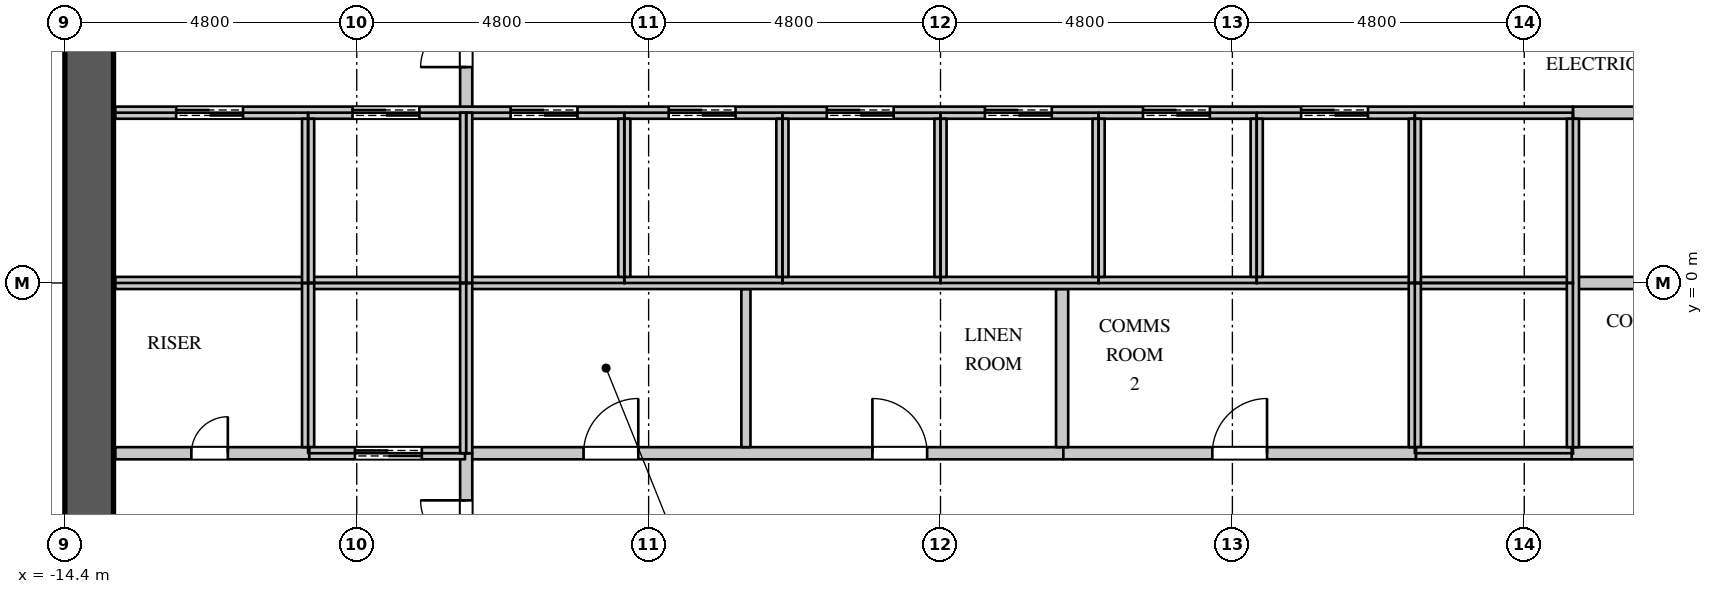
"""IFC4 building model, lengths in metres.
Left out: names, types, materials, properties, quantities, classifications, styles, units other than length and angle.
Written with IfcOpenShell. Run it as: python <this file> out.ifc"""

import sys

from ifc_helpers import new_model, si_unit, direction, frame, frame_2d, origin, place, context, subcontext, project, spatial, rectangle, extrude, element, fill, save


model = new_model("IFC4")
c1 = context("Model", 3, precision=1e-05, world=origin(), true_north=direction((0.0, 1.0)))
c2 = subcontext(c1, "Body", "Model", "MODEL_VIEW")
j1 = project(units=[si_unit("LENGTHUNIT", "METRE"), si_unit("PLANEANGLEUNIT", "RADIAN")], contexts=[c1])
p1 = place(None, origin())
s1 = spatial("IfcSite", under=j1, at=p1, CompositionType="ELEMENT")
p2 = place(p1, origin())
s2 = spatial("IfcBuilding", under=s1, at=p2, CompositionType="ELEMENT")
p3 = place(p2, frame((0.0, 0.0, 131.7)))
s3 = spatial("IfcBuildingStorey", under=s2, at=p3, CompositionType="ELEMENT", Elevation=131.7)
p4 = place(p3, frame((-14.0, -11.2, 0.0), z_axis=(0.0, 0.0, 1.0), x_axis=(0.0, 1.0, 0.0)))
e1 = element("IfcWall", 1, at=p4, inside=s3, PredefinedType="SHEAR", context=c2, shape_type="SweptSolid", body=[
    extrude(rectangle(XDim=22.4, YDim=0.8, at=frame_2d((11.2, 0.0))), origin(), (0.0, 0.0, 1.0), 4.2),
])
p5 = place(p4, frame((20.25, 0.0, 0.0)))
e2 = element("IfcOpeningElement", 2, at=p5, cuts=e1, PredefinedType="OPENING", context=c2, shape_type="SweptSolid", body=[
    extrude(rectangle(XDim=1.1, YDim=2.2, at=frame_2d((0.55, 1.1))), frame((0.0, 0.41, 0.0), z_axis=(0.0, -1.0, 0.0), x_axis=(1.0, 0.0, 0.0)), (0.0, 0.0, 1.0), 0.82),
])
p6 = place(p4, frame((1.05, 0.0, 0.0)))
e3 = element("IfcOpeningElement", 3, at=p6, cuts=e1, PredefinedType="OPENING", context=c2, shape_type="SweptSolid", body=[
    extrude(rectangle(XDim=1.1, YDim=2.2, at=frame_2d((0.55, 1.1))), frame((0.0, 0.41, 0.0), z_axis=(0.0, -1.0, 0.0), x_axis=(1.0, 0.0, 0.0)), (0.0, 0.0, 1.0), 0.82),
])
p7 = place(p4, frame((15.95, 0.0, 0.0)))
e4 = element("IfcOpeningElement", 4, at=p7, cuts=e1, PredefinedType="OPENING", context=c2, shape_type="SweptSolid", body=[
    extrude(rectangle(XDim=1.5, YDim=2.4, at=frame_2d((0.75, 1.2))), frame((0.0, 0.41, 0.0), z_axis=(0.0, -1.0, 0.0), x_axis=(1.0, 0.0, 0.0)), (0.0, 0.0, 1.0), 0.82),
])
p8 = place(p4, frame((4.95, 0.0, 0.0)))
e5 = element("IfcOpeningElement", 5, at=p8, cuts=e1, PredefinedType="OPENING", context=c2, shape_type="SweptSolid", body=[
    extrude(rectangle(XDim=1.5, YDim=2.4, at=frame_2d((0.75, 1.2))), frame((0.0, 0.41, 0.0), z_axis=(0.0, -1.0, 0.0), x_axis=(1.0, 0.0, 0.0)), (0.0, 0.0, 1.0), 0.82),
])
p9 = place(p3, frame((-7.82, -2.8, 0.0), z_axis=(0.0, 0.0, 1.0), x_axis=(1.0, 0.0, 0.0)))
e6 = element("IfcWall", 6, at=p9, inside=s3, PredefinedType="PARTITIONING", context=c2, shape_type="SweptSolid", body=[
    extrude(rectangle(XDim=9.84, YDim=0.2, at=frame_2d((4.92, 0.0))), origin(), (0.0, 0.0, 1.0), 3.95),
])
p10 = place(p9, frame((1.95, 0.0, 0.0)))
e7 = element("IfcOpeningElement", 7, at=p10, cuts=e6, PredefinedType="OPENING", context=c2, shape_type="SweptSolid", body=[
    extrude(rectangle(XDim=0.9, YDim=2.2, at=frame_2d((0.45, 1.1))), frame((0.0, 0.11, 0.0), z_axis=(0.0, -1.0, 0.0), x_axis=(1.0, 0.0, 0.0)), (0.0, 0.0, 1.0), 0.22),
])
p11 = place(p9, frame((6.7, 0.0, 0.0)))
e8 = element("IfcOpeningElement", 8, at=p11, cuts=e6, PredefinedType="OPENING", context=c2, shape_type="SweptSolid", body=[
    extrude(rectangle(XDim=0.9, YDim=2.2, at=frame_2d((0.45, 1.1))), frame((0.0, 0.11, 0.0), z_axis=(0.0, -1.0, 0.0), x_axis=(1.0, 0.0, 0.0)), (0.0, 0.0, 1.0), 0.22),
])
p12 = place(p3, frame((-7.8, -8.075, 0.0), z_axis=(0.0, 0.0, 1.0), x_axis=(0.0, 1.0, 0.0)))
e9 = element("IfcWall", 9, at=p12, inside=s3, PredefinedType="PARTITIONING", context=c2, shape_type="SweptSolid", body=[
    extrude(rectangle(XDim=5.275, YDim=0.2, at=frame_2d((2.637, 0.0))), origin(), (0.0, 0.0, 1.0), 3.95),
])
p13 = place(p12, frame((3.0, 0.0, 0.0)))
e10 = element("IfcOpeningElement", 10, at=p13, cuts=e9, PredefinedType="OPENING", context=c2, shape_type="SweptSolid", body=[
    extrude(rectangle(XDim=1.5, YDim=2.4, at=frame_2d((0.75, 1.2))), frame((0.0, 0.11, 0.0), z_axis=(0.0, -1.0, 0.0), x_axis=(1.0, 0.0, 0.0)), (0.0, 0.0, 1.0), 0.22),
])
p14 = place(p3, frame((-7.8, 2.8, 0.0), z_axis=(0.0, 0.0, 1.0), x_axis=(0.0, 1.0, 0.0)))
e11 = element("IfcWall", 11, at=p14, inside=s3, PredefinedType="PARTITIONING", context=c2, shape_type="SweptSolid", body=[
    extrude(rectangle(XDim=5.275, YDim=0.2, at=frame_2d((2.637, 0.0))), origin(), (0.0, 0.0, 1.0), 3.95),
])
p15 = place(p14, frame((0.75, 0.0, 0.0)))
e12 = element("IfcOpeningElement", 12, at=p15, cuts=e11, PredefinedType="OPENING", context=c2, shape_type="SweptSolid", body=[
    extrude(rectangle(XDim=1.5, YDim=2.4, at=frame_2d((0.75, 1.2))), frame((0.0, 0.11, 0.0), z_axis=(0.0, -1.0, 0.0), x_axis=(1.0, 0.0, 0.0)), (0.0, 0.0, 1.0), 0.22),
])
p16 = place(p3, frame((-3.2, -2.7, 0.0), z_axis=(0.0, 0.0, 1.0), x_axis=(0.0, 1.0, 0.0)))
e13 = element("IfcWall", 13, at=p16, inside=s3, PredefinedType="PARTITIONING", context=c2, shape_type="SweptSolid", body=[
    extrude(rectangle(XDim=2.6, YDim=0.15, at=frame_2d((1.3, 0.0))), origin(), (0.0, 0.0, 1.0), 3.95),
])
p17 = place(p3, frame((-13.57, -2.8, 0.0), z_axis=(0.0, 0.0, 1.0), x_axis=(1.0, 0.0, 0.0)))
e14 = element("IfcWall", 14, at=p17, inside=s3, PredefinedType="PARTITIONING", context=c2, shape_type="SweptSolid", body=[
    extrude(rectangle(XDim=3.19, YDim=0.2, at=frame_2d((1.595, 0.0))), origin(), (0.0, 0.0, 1.0), 3.95),
])
p18 = place(p17, frame((1.25, 0.0, 0.0)))
e15 = element("IfcOpeningElement", 15, at=p18, cuts=e14, PredefinedType="OPENING", context=c2, shape_type="SweptSolid", body=[
    extrude(rectangle(XDim=0.6, YDim=2.0, at=frame_2d((0.3, 1.0))), frame((0.0, 0.11, 0.0), z_axis=(0.0, -1.0, 0.0), x_axis=(1.0, 0.0, 0.0)), (0.0, 0.0, 1.0), 0.22),
])
p19 = place(p3, frame((2.02, -2.8, 0.0), z_axis=(0.0, 0.0, 1.0), x_axis=(1.0, 0.0, 0.0)))
e16 = element("IfcWall", 16, at=p19, inside=s3, PredefinedType="PARTITIONING", context=c2, shape_type="SweptSolid", body=[
    extrude(rectangle(XDim=5.8, YDim=0.2, at=frame_2d((2.9, 0.0))), origin(), (0.0, 0.0, 1.0), 3.95),
])
p20 = place(p19, frame((2.45, 0.0, 0.0)))
e17 = element("IfcOpeningElement", 17, at=p20, cuts=e16, PredefinedType="OPENING", context=c2, shape_type="SweptSolid", body=[
    extrude(rectangle(XDim=0.9, YDim=2.2, at=frame_2d((0.45, 1.1))), frame((0.0, 0.11, 0.0), z_axis=(0.0, -1.0, 0.0), x_axis=(1.0, 0.0, 0.0)), (0.0, 0.0, 1.0), 0.22),
])
p21 = place(p3, frame((2.0, -2.7, 0.0), z_axis=(0.0, 0.0, 1.0), x_axis=(0.0, 1.0, 0.0)))
e18 = element("IfcWall", 18, at=p21, inside=s3, PredefinedType="PARTITIONING", context=c2, shape_type="SweptSolid", body=[
    extrude(rectangle(XDim=2.6, YDim=0.2, at=frame_2d((1.3, 0.0))), origin(), (0.0, 0.0, 1.0), 3.95),
])
p22 = place(p3, frame((10.38, -2.8, 0.0), z_axis=(0.0, 0.0, 1.0), x_axis=(1.0, 0.0, 0.0)))
e19 = element("IfcWall", 19, at=p22, inside=s3, PredefinedType="PARTITIONING", context=c2, shape_type="SweptSolid", body=[
    extrude(rectangle(XDim=3.19, YDim=0.2, at=frame_2d((1.595, 0.0))), origin(), (0.0, 0.0, 1.0), 3.95),
])
p23 = place(p22, frame((1.1, 0.0, 0.0)))
e20 = element("IfcOpeningElement", 20, at=p23, cuts=e19, PredefinedType="OPENING", context=c2, shape_type="SweptSolid", body=[
    extrude(rectangle(XDim=0.9, YDim=2.2, at=frame_2d((0.45, 1.1))), frame((0.0, 0.11, 0.0), z_axis=(0.0, -1.0, 0.0), x_axis=(1.0, 0.0, 0.0)), (0.0, 0.0, 1.0), 0.22),
])
p24 = place(p3, frame((10.4, 2.8, 0.0), z_axis=(0.0, 0.0, 1.0), x_axis=(1.0, 0.0, 0.0)))
e21 = element("IfcWall", 21, at=p24, inside=s3, PredefinedType="PARTITIONING", context=c2, shape_type="SweptSolid", body=[
    extrude(rectangle(XDim=3.17, YDim=0.2, at=frame_2d((1.585, 0.0))), origin(), (0.0, 0.0, 1.0), 3.95),
])
p25 = place(p24, frame((1.25, 0.0, 0.0)))
e22 = element("IfcOpeningElement", 22, at=p25, cuts=e21, PredefinedType="OPENING", context=c2, shape_type="SweptSolid", body=[
    extrude(rectangle(XDim=0.6, YDim=2.0, at=frame_2d((0.3, 1.0))), frame((0.0, 0.11, 0.0), z_axis=(0.0, -1.0, 0.0), x_axis=(1.0, 0.0, 0.0)), (0.0, 0.0, 1.0), 0.22),
])
p26 = place(p3, frame((10.4, 0.0, 0.0), z_axis=(0.0, 0.0, 1.0), x_axis=(1.0, 0.0, 0.0)))
e23 = element("IfcWall", 23, at=p26, inside=s3, PredefinedType="PARTITIONING", context=c2, shape_type="SweptSolid", body=[
    extrude(rectangle(XDim=3.17, YDim=0.2, at=frame_2d((1.585, 0.0))), origin(), (0.0, 0.0, 1.0), 3.95),
])
p27 = place(p3, frame((-13.57, 0.0, 0.0), z_axis=(0.0, 0.0, 1.0), x_axis=(1.0, 0.0, 0.0)))
e24 = element("IfcWall", 24, at=p27, inside=s3, PredefinedType="PARTITIONING", context=c2, shape_type="SweptSolid", body=[
    extrude(rectangle(XDim=23.97, YDim=0.2, at=frame_2d((11.985, 0.0))), origin(), (0.0, 0.0, 1.0), 3.95),
])
p28 = place(p3, frame((-13.57, 2.8, 0.0), z_axis=(0.0, 0.0, 1.0), x_axis=(1.0, 0.0, 0.0)))
e25 = element("IfcWall", 25, at=p28, inside=s3, PredefinedType="PARTITIONING", context=c2, shape_type="SweptSolid", body=[
    extrude(rectangle(XDim=23.97, YDim=0.2, at=frame_2d((11.985, 0.0))), origin(), (0.0, 0.0, 1.0), 3.95),
])
p29 = place(p28, frame((1.0, 0.0, 0.0)))
e26 = element("IfcOpeningElement", 26, at=p29, cuts=e25, PredefinedType="OPENING", context=c2, shape_type="SweptSolid", body=[
    extrude(rectangle(XDim=1.1, YDim=2.2, at=frame_2d((0.55, 1.1))), frame((0.0, 0.11, 0.0), z_axis=(0.0, -1.0, 0.0), x_axis=(1.0, 0.0, 0.0)), (0.0, 0.0, 1.0), 0.22),
])
p30 = place(p28, frame((3.9, 0.0, 0.0)))
e27 = element("IfcOpeningElement", 27, at=p30, cuts=e25, PredefinedType="OPENING", context=c2, shape_type="SweptSolid", body=[
    extrude(rectangle(XDim=1.1, YDim=2.2, at=frame_2d((0.55, 1.1))), frame((0.0, 0.11, 0.0), z_axis=(0.0, -1.0, 0.0), x_axis=(1.0, 0.0, 0.0)), (0.0, 0.0, 1.0), 0.22),
])
p31 = place(p28, frame((6.5, 0.0, 0.0)))
e28 = element("IfcOpeningElement", 28, at=p31, cuts=e25, PredefinedType="OPENING", context=c2, shape_type="SweptSolid", body=[
    extrude(rectangle(XDim=1.1, YDim=2.2, at=frame_2d((0.55, 1.1))), frame((0.0, 0.11, 0.0), z_axis=(0.0, -1.0, 0.0), x_axis=(1.0, 0.0, 0.0)), (0.0, 0.0, 1.0), 0.22),
])
p32 = place(p28, frame((9.1, 0.0, 0.0)))
e29 = element("IfcOpeningElement", 29, at=p32, cuts=e25, PredefinedType="OPENING", context=c2, shape_type="SweptSolid", body=[
    extrude(rectangle(XDim=1.1, YDim=2.2, at=frame_2d((0.55, 1.1))), frame((0.0, 0.11, 0.0), z_axis=(0.0, -1.0, 0.0), x_axis=(1.0, 0.0, 0.0)), (0.0, 0.0, 1.0), 0.22),
])
p33 = place(p28, frame((11.7, 0.0, 0.0)))
e30 = element("IfcOpeningElement", 30, at=p33, cuts=e25, PredefinedType="OPENING", context=c2, shape_type="SweptSolid", body=[
    extrude(rectangle(XDim=1.1, YDim=2.2, at=frame_2d((0.55, 1.1))), frame((0.0, 0.11, 0.0), z_axis=(0.0, -1.0, 0.0), x_axis=(1.0, 0.0, 0.0)), (0.0, 0.0, 1.0), 0.22),
])
p34 = place(p28, frame((14.3, 0.0, 0.0)))
e31 = element("IfcOpeningElement", 31, at=p34, cuts=e25, PredefinedType="OPENING", context=c2, shape_type="SweptSolid", body=[
    extrude(rectangle(XDim=1.1, YDim=2.2, at=frame_2d((0.55, 1.1))), frame((0.0, 0.11, 0.0), z_axis=(0.0, -1.0, 0.0), x_axis=(1.0, 0.0, 0.0)), (0.0, 0.0, 1.0), 0.22),
])
p35 = place(p28, frame((16.9, 0.0, 0.0)))
e32 = element("IfcOpeningElement", 32, at=p35, cuts=e25, PredefinedType="OPENING", context=c2, shape_type="SweptSolid", body=[
    extrude(rectangle(XDim=1.1, YDim=2.2, at=frame_2d((0.55, 1.1))), frame((0.0, 0.11, 0.0), z_axis=(0.0, -1.0, 0.0), x_axis=(1.0, 0.0, 0.0)), (0.0, 0.0, 1.0), 0.22),
])
p36 = place(p28, frame((19.5, 0.0, 0.0)))
e33 = element("IfcOpeningElement", 33, at=p36, cuts=e25, PredefinedType="OPENING", context=c2, shape_type="SweptSolid", body=[
    extrude(rectangle(XDim=1.1, YDim=2.2, at=frame_2d((0.55, 1.1))), frame((0.0, 0.11, 0.0), z_axis=(0.0, -1.0, 0.0), x_axis=(1.0, 0.0, 0.0)), (0.0, 0.0, 1.0), 0.22),
])
p37 = place(p3, frame((-10.4, -2.7, 0.0), z_axis=(0.0, 0.0, 1.0), x_axis=(0.0, 1.0, 0.0)))
e34 = element("IfcWall", 34, at=p37, inside=s3, PredefinedType="PARTITIONING", context=c2, shape_type="SweptSolid", body=[
    extrude(rectangle(XDim=2.7, YDim=0.2, at=frame_2d((1.35, 0.0))), origin(), (0.0, 0.0, 1.0), 3.95),
])
p38 = place(p3, frame((-10.38, -2.8, 0.0), z_axis=(0.0, 0.0, 1.0), x_axis=(1.0, 0.0, 0.0)))
e35 = element("IfcWall", 35, at=p38, inside=s3, PredefinedType="PARTITIONING", context=c2, shape_type="SweptSolid", body=[
    extrude(rectangle(XDim=2.56, YDim=0.2, at=frame_2d((1.28, 0.0))), origin(), (0.0, 0.0, 1.0), 3.95),
])
p39 = place(p38, frame((0.75, 0.0, 0.0)))
e36 = element("IfcOpeningElement", 36, at=p39, cuts=e35, PredefinedType="OPENING", context=c2, shape_type="SweptSolid", body=[
    extrude(rectangle(XDim=1.1, YDim=2.2, at=frame_2d((0.55, 1.1))), frame((0.0, 0.11, 0.0), z_axis=(0.0, -1.0, 0.0), x_axis=(1.0, 0.0, 0.0)), (0.0, 0.0, 1.0), 0.22),
])
p40 = place(p3, frame((-10.4, 0.0, 0.0), z_axis=(0.0, 0.0, 1.0), x_axis=(0.0, 1.0, 0.0)))
e37 = element("IfcWall", 37, at=p40, inside=s3, PredefinedType="PARTITIONING", context=c2, shape_type="SweptSolid", body=[
    extrude(rectangle(XDim=2.7, YDim=0.2, at=frame_2d((1.35, 0.0))), origin(), (0.0, 0.0, 1.0), 3.95),
])
for number, where, z_axis, x_axis in (
    (38, (-7.8, -2.8, 0.0), (0.0, 0.0, 1.0), (0.0, 1.0, 0.0)),
    (39, (-7.8, 0.0, 0.0), (0.0, 0.0, 1.0), (0.0, 1.0, 0.0)),
):
    element("IfcWall", number, at=place(p3, frame(where, z_axis=z_axis, x_axis=x_axis)), inside=s3, PredefinedType="PARTITIONING", context=c2, shape_type="SweptSolid", body=[
        extrude(rectangle(XDim=2.8, YDim=0.2, at=frame_2d((1.4, 0.0))), origin(), (0.0, 0.0, 1.0), 3.95),
    ])
for number, where, z_axis, x_axis in (
    (40, (-5.2, 0.1, 0.0), (0.0, 0.0, 1.0), (0.0, 1.0, 0.0)),
    (41, (-2.6, 0.1, 0.0), (0.0, 0.0, 1.0), (0.0, 1.0, 0.0)),
    (42, (0.0, 0.1, 0.0), (0.0, 0.0, 1.0), (0.0, 1.0, 0.0)),
    (43, (2.6, 0.1, 0.0), (0.0, 0.0, 1.0), (0.0, 1.0, 0.0)),
    (44, (5.2, 0.1, 0.0), (0.0, 0.0, 1.0), (0.0, 1.0, 0.0)),
):
    element("IfcWall", number, at=place(p3, frame(where, z_axis=z_axis, x_axis=x_axis)), inside=s3, PredefinedType="PARTITIONING", context=c2, shape_type="SweptSolid", body=[
        extrude(rectangle(XDim=2.6, YDim=0.2, at=frame_2d((1.3, 0.0))), origin(), (0.0, 0.0, 1.0), 3.95),
    ])
p41 = place(p3, frame((7.8, -2.7, 0.0), z_axis=(0.0, 0.0, 1.0), x_axis=(0.0, 1.0, 0.0)))
e45 = element("IfcWall", 45, at=p41, inside=s3, PredefinedType="PARTITIONING", context=c2, shape_type="SweptSolid", body=[
    extrude(rectangle(XDim=2.7, YDim=0.2, at=frame_2d((1.35, 0.0))), origin(), (0.0, 0.0, 1.0), 3.95),
])
p42 = place(p3, frame((7.82, -2.8, 0.0), z_axis=(0.0, 0.0, 1.0), x_axis=(1.0, 0.0, 0.0)))
e46 = element("IfcWall", 46, at=p42, inside=s3, PredefinedType="PARTITIONING", context=c2, shape_type="SweptSolid", body=[
    extrude(rectangle(XDim=2.56, YDim=0.2, at=frame_2d((1.28, 0.0))), origin(), (0.0, 0.0, 1.0), 3.95),
])
p43 = place(p3, frame((7.8, 0.0, 0.0), z_axis=(0.0, 0.0, 1.0), x_axis=(0.0, 1.0, 0.0)))
e47 = element("IfcWall", 47, at=p43, inside=s3, PredefinedType="PARTITIONING", context=c2, shape_type="SweptSolid", body=[
    extrude(rectangle(XDim=2.7, YDim=0.2, at=frame_2d((1.35, 0.0))), origin(), (0.0, 0.0, 1.0), 3.95),
])
p44 = place(p3, frame((10.4, -2.7, 0.0), z_axis=(0.0, 0.0, 1.0), x_axis=(0.0, 1.0, 0.0)))
e48 = element("IfcWall", 48, at=p44, inside=s3, PredefinedType="PARTITIONING", context=c2, shape_type="SweptSolid", body=[
    extrude(rectangle(XDim=5.4, YDim=0.2, at=frame_2d((2.7, 0.0))), origin(), (0.0, 0.0, 1.0), 3.95),
])
p45 = place(p18, origin())
e49 = element("IfcDoor", 49, at=p45, inside=s3, OperationType="SINGLE_SWING_RIGHT", PredefinedType="DOOR", context=c2, shape_type="SweptSolid", body=[
    extrude(rectangle(XDim=0.6, YDim=2.0, at=frame_2d((0.3, 1.0))), frame((0.0, 0.025, 0.0), z_axis=(0.0, -1.0, 0.0), x_axis=(1.0, 0.0, 0.0)), (0.0, 0.0, 1.0), 0.05),
])
fill(e15, e49)
p46 = place(p10, origin())
e50 = element("IfcDoor", 50, at=p46, inside=s3, OperationType="SINGLE_SWING_RIGHT", PredefinedType="DOOR", context=c2, shape_type="SweptSolid", body=[
    extrude(rectangle(XDim=0.9, YDim=2.2, at=frame_2d((0.45, 1.1))), frame((0.0, 0.025, 0.0), z_axis=(0.0, -1.0, 0.0), x_axis=(1.0, 0.0, 0.0)), (0.0, 0.0, 1.0), 0.05),
])
fill(e7, e50)
p47 = place(p11, origin())
e51 = element("IfcDoor", 51, at=p47, inside=s3, OperationType="SINGLE_SWING_LEFT", PredefinedType="DOOR", context=c2, shape_type="SweptSolid", body=[
    extrude(rectangle(XDim=0.9, YDim=2.2, at=frame_2d((0.45, 1.1))), frame((0.0, 0.025, 0.0), z_axis=(0.0, -1.0, 0.0), x_axis=(1.0, 0.0, 0.0)), (0.0, 0.0, 1.0), 0.05),
])
fill(e8, e51)
p48 = place(p20, origin())
e52 = element("IfcDoor", 52, at=p48, inside=s3, OperationType="SINGLE_SWING_RIGHT", PredefinedType="DOOR", context=c2, shape_type="SweptSolid", body=[
    extrude(rectangle(XDim=0.9, YDim=2.2, at=frame_2d((0.45, 1.1))), frame((0.0, 0.025, 0.0), z_axis=(0.0, -1.0, 0.0), x_axis=(1.0, 0.0, 0.0)), (0.0, 0.0, 1.0), 0.05),
])
fill(e17, e52)
p49 = place(p29, origin())
e53 = element("IfcDoor", 53, at=p49, inside=s3, OperationType="DOUBLE_DOOR_SLIDING", PredefinedType="DOOR", context=c2, shape_type="SweptSolid", body=[
    extrude(rectangle(XDim=1.1, YDim=2.2, at=frame_2d((0.55, 1.1))), frame((0.0, 0.025, 0.0), z_axis=(0.0, -1.0, 0.0), x_axis=(1.0, 0.0, 0.0)), (0.0, 0.0, 1.0), 0.05),
])
fill(e26, e53)
p50 = place(p30, origin())
e54 = element("IfcDoor", 54, at=p50, inside=s3, OperationType="DOUBLE_DOOR_SLIDING", PredefinedType="DOOR", context=c2, shape_type="SweptSolid", body=[
    extrude(rectangle(XDim=1.1, YDim=2.2, at=frame_2d((0.55, 1.1))), frame((0.0, 0.025, 0.0), z_axis=(0.0, -1.0, 0.0), x_axis=(1.0, 0.0, 0.0)), (0.0, 0.0, 1.0), 0.05),
])
fill(e27, e54)
p51 = place(p39, origin())
e55 = element("IfcDoor", 55, at=p51, inside=s3, OperationType="DOUBLE_DOOR_SLIDING", PredefinedType="DOOR", context=c2, shape_type="SweptSolid", body=[
    extrude(rectangle(XDim=1.1, YDim=2.2, at=frame_2d((0.55, 1.1))), frame((0.0, 0.025, 0.0), z_axis=(0.0, -1.0, 0.0), x_axis=(1.0, 0.0, 0.0)), (0.0, 0.0, 1.0), 0.05),
])
fill(e36, e55)
p52 = place(p31, origin())
e56 = element("IfcDoor", 56, at=p52, inside=s3, OperationType="DOUBLE_DOOR_SLIDING", PredefinedType="DOOR", context=c2, shape_type="SweptSolid", body=[
    extrude(rectangle(XDim=1.1, YDim=2.2, at=frame_2d((0.55, 1.1))), frame((0.0, 0.025, 0.0), z_axis=(0.0, -1.0, 0.0), x_axis=(1.0, 0.0, 0.0)), (0.0, 0.0, 1.0), 0.05),
])
fill(e28, e56)
p53 = place(p32, origin())
e57 = element("IfcDoor", 57, at=p53, inside=s3, OperationType="DOUBLE_DOOR_SLIDING", PredefinedType="DOOR", context=c2, shape_type="SweptSolid", body=[
    extrude(rectangle(XDim=1.1, YDim=2.2, at=frame_2d((0.55, 1.1))), frame((0.0, 0.025, 0.0), z_axis=(0.0, -1.0, 0.0), x_axis=(1.0, 0.0, 0.0)), (0.0, 0.0, 1.0), 0.05),
])
fill(e29, e57)
p54 = place(p33, origin())
e58 = element("IfcDoor", 58, at=p54, inside=s3, OperationType="DOUBLE_DOOR_SLIDING", PredefinedType="DOOR", context=c2, shape_type="SweptSolid", body=[
    extrude(rectangle(XDim=1.1, YDim=2.2, at=frame_2d((0.55, 1.1))), frame((0.0, 0.025, 0.0), z_axis=(0.0, -1.0, 0.0), x_axis=(1.0, 0.0, 0.0)), (0.0, 0.0, 1.0), 0.05),
])
fill(e30, e58)
p55 = place(p34, origin())
e59 = element("IfcDoor", 59, at=p55, inside=s3, OperationType="DOUBLE_DOOR_SLIDING", PredefinedType="DOOR", context=c2, shape_type="SweptSolid", body=[
    extrude(rectangle(XDim=1.1, YDim=2.2, at=frame_2d((0.55, 1.1))), frame((0.0, 0.025, 0.0), z_axis=(0.0, -1.0, 0.0), x_axis=(1.0, 0.0, 0.0)), (0.0, 0.0, 1.0), 0.05),
])
fill(e31, e59)
p56 = place(p35, origin())
e60 = element("IfcDoor", 60, at=p56, inside=s3, OperationType="DOUBLE_DOOR_SLIDING", PredefinedType="DOOR", context=c2, shape_type="SweptSolid", body=[
    extrude(rectangle(XDim=1.1, YDim=2.2, at=frame_2d((0.55, 1.1))), frame((0.0, 0.025, 0.0), z_axis=(0.0, -1.0, 0.0), x_axis=(1.0, 0.0, 0.0)), (0.0, 0.0, 1.0), 0.05),
])
fill(e32, e60)
p57 = place(p36, origin())
e61 = element("IfcDoor", 61, at=p57, inside=s3, OperationType="DOUBLE_DOOR_SLIDING", PredefinedType="DOOR", context=c2, shape_type="SweptSolid", body=[
    extrude(rectangle(XDim=1.1, YDim=2.2, at=frame_2d((0.55, 1.1))), frame((0.0, 0.025, 0.0), z_axis=(0.0, -1.0, 0.0), x_axis=(1.0, 0.0, 0.0)), (0.0, 0.0, 1.0), 0.05),
])
fill(e33, e61)
p58 = place(p15, origin())
e62 = element("IfcDoor", 62, at=p58, inside=s3, OperationType="DOUBLE_DOOR_SINGLE_SWING", PredefinedType="DOOR", context=c2, shape_type="SweptSolid", body=[
    extrude(rectangle(XDim=1.5, YDim=2.4, at=frame_2d((0.75, 1.2))), frame((0.0, 0.025, 0.0), z_axis=(0.0, -1.0, 0.0), x_axis=(1.0, 0.0, 0.0)), (0.0, 0.0, 1.0), 0.05),
])
fill(e12, e62)
p59 = place(p13, origin())
e63 = element("IfcDoor", 63, at=p59, inside=s3, OperationType="DOUBLE_DOOR_SINGLE_SWING", PredefinedType="DOOR", context=c2, shape_type="SweptSolid", body=[
    extrude(rectangle(XDim=1.5, YDim=2.4, at=frame_2d((0.75, 1.2))), frame((0.0, 0.025, 0.0), z_axis=(0.0, -1.0, 0.0), x_axis=(1.0, 0.0, 0.0)), (0.0, 0.0, 1.0), 0.05),
])
fill(e10, e63)
save(model, sys.argv[1])
